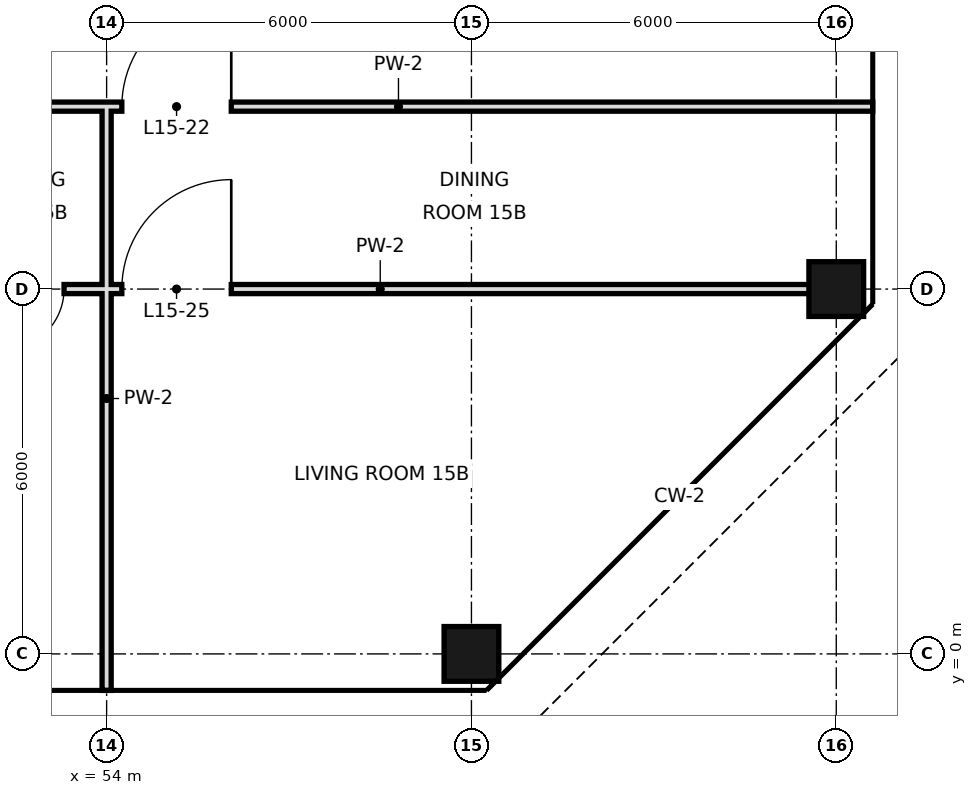
"""IFC4 building model, lengths in metres.
Left out: names, types, materials, properties, quantities, classifications, styles, units other than length and angle.
Written with IfcOpenShell. Run it as: python <this file> out.ifc"""

import sys

from ifc_helpers import new_model, si_unit, direction, frame, frame_2d, origin, origin_2d, place, context, subcontext, project, spatial, rectangle, hollow_rectangle, extrude, element, fill, save


model = new_model("IFC4")
c1 = context("Model", 3, precision=1e-05, world=origin(), true_north=direction((0.0, 1.0)))
c2 = subcontext(c1, "Body", "Model", "MODEL_VIEW")
j1 = project(units=[si_unit("LENGTHUNIT", "METRE"), si_unit("PLANEANGLEUNIT", "RADIAN")], contexts=[c1])
p1 = place(None, origin())
s1 = spatial("IfcSite", under=j1, at=p1, CompositionType="ELEMENT")
p2 = place(p1, origin())
s2 = spatial("IfcBuilding", under=s1, at=p2, CompositionType="ELEMENT")
p3 = place(p2, frame((0.0, 0.0, 75.0)))
s3 = spatial("IfcBuildingStorey", under=s2, at=p3, CompositionType="ELEMENT", Elevation=75.0)
for number, where, z_axis, x_axis in (
    (1, (60.0, 0.0, 0.0), (0.0, 0.0, 1.0), (1.0, 0.0, 0.0)),
    (2, (66.0, 6.0, 0.0), (0.0, 0.0, 1.0), (1.0, 0.0, 0.0)),
):
    element("IfcColumn", number, at=place(p3, frame(where, z_axis=z_axis, x_axis=x_axis)), inside=s3, PredefinedType="COLUMN", context=c2, shape_type="SweptSolid", body=[
        extrude(hollow_rectangle(XDim=0.9, YDim=0.9, WallThickness=0.045, at=origin_2d()), origin(), (0.0, 0.0, 1.0), 3.6),
    ])
p4 = place(p3, frame((54.0, -0.6, 0.0), z_axis=(0.0, 0.0, 1.0), x_axis=(0.0, 1.0, 0.0)))
e3 = element("IfcWall", 3, at=p4, inside=s3, PredefinedType="PARTITIONING", context=c2, shape_type="SweptSolid", body=[
    extrude(rectangle(XDim=9.6, YDim=0.15, at=frame_2d((4.8, 0.0))), origin(), (0.0, 0.0, 1.0), 3.42),
])
p5 = place(p3, frame((51.0, 6.0, 0.0), z_axis=(0.0, 0.0, 1.0), x_axis=(1.0, 0.0, 0.0)))
e4 = element("IfcWall", 4, at=p5, inside=s3, PredefinedType="PARTITIONING", context=c2, shape_type="SweptSolid", body=[
    extrude(rectangle(XDim=15.0, YDim=0.15, at=frame_2d((7.5, 0.0))), origin(), (0.0, 0.0, 1.0), 2.52),
])
p6 = place(p5, frame((1.3, 0.0, 0.0)))
e5 = element("IfcOpeningElement", 5, at=p6, cuts=e4, PredefinedType="OPENING", context=c2, shape_type="SweptSolid", body=[
    extrude(rectangle(XDim=1.0, YDim=2.4, at=frame_2d((0.5, 1.2))), frame((0.0, 0.085, 0.0), z_axis=(0.0, -1.0, 0.0), x_axis=(1.0, 0.0, 0.0)), (0.0, 0.0, 1.0), 0.17),
])
p7 = place(p5, frame((3.25, 0.0, 0.0)))
e6 = element("IfcOpeningElement", 6, at=p7, cuts=e4, PredefinedType="OPENING", context=c2, shape_type="SweptSolid", body=[
    extrude(rectangle(XDim=1.8, YDim=2.4, at=frame_2d((0.9, 1.2))), frame((0.0, 0.085, 0.0), z_axis=(0.0, -1.0, 0.0), x_axis=(1.0, 0.0, 0.0)), (0.0, 0.0, 1.0), 0.17),
])
p8 = place(p3, frame((51.0, 9.0, 0.0), z_axis=(0.0, 0.0, 1.0), x_axis=(1.0, 0.0, 0.0)))
e7 = element("IfcWall", 7, at=p8, inside=s3, PredefinedType="PARTITIONING", context=c2, shape_type="SweptSolid", body=[
    extrude(rectangle(XDim=15.6, YDim=0.15, at=frame_2d((7.8, 0.0))), origin(), (0.0, 0.0, 1.0), 3.42),
])
p9 = place(p8, frame((1.0, 0.0, 0.0)))
e8 = element("IfcOpeningElement", 8, at=p9, cuts=e7, PredefinedType="OPENING", context=c2, shape_type="SweptSolid", body=[
    extrude(rectangle(XDim=1.0, YDim=2.4, at=frame_2d((0.5, 1.2))), frame((0.0, 0.085, 0.0), z_axis=(0.0, -1.0, 0.0), x_axis=(1.0, 0.0, 0.0)), (0.0, 0.0, 1.0), 0.17),
])
p10 = place(p8, frame((3.25, 0.0, 0.0)))
e9 = element("IfcOpeningElement", 9, at=p10, cuts=e7, PredefinedType="OPENING", context=c2, shape_type="SweptSolid", body=[
    extrude(rectangle(XDim=1.8, YDim=2.4, at=frame_2d((0.9, 1.2))), frame((0.0, 0.085, 0.0), z_axis=(0.0, -1.0, 0.0), x_axis=(1.0, 0.0, 0.0)), (0.0, 0.0, 1.0), 0.17),
])
p11 = place(p10, frame((1.8, 0.0, 0.0), z_axis=(0.0, 0.0, 1.0), x_axis=(-1.0, 0.0, 0.0)))
e10 = element("IfcDoor", 10, at=p11, inside=s3, OperationType="SINGLE_SWING_LEFT", PredefinedType="DOOR", context=c2, shape_type="SweptSolid", body=[
    extrude(rectangle(XDim=1.8, YDim=2.4, at=frame_2d((0.9, 1.2))), frame((0.0, 0.025, 0.0), z_axis=(0.0, -1.0, 0.0), x_axis=(1.0, 0.0, 0.0)), (0.0, 0.0, 1.0), 0.05),
])
fill(e9, e10)
p12 = place(p6, frame((1.0, 0.0, 0.0), z_axis=(0.0, 0.0, 1.0), x_axis=(-1.0, 0.0, 0.0)))
e11 = element("IfcDoor", 11, at=p12, inside=s3, OperationType="SINGLE_SWING_RIGHT", PredefinedType="DOOR", context=c2, shape_type="SweptSolid", body=[
    extrude(rectangle(XDim=1.0, YDim=2.4, at=frame_2d((0.5, 1.2))), frame((0.0, 0.025, 0.0), z_axis=(0.0, -1.0, 0.0), x_axis=(1.0, 0.0, 0.0)), (0.0, 0.0, 1.0), 0.05),
])
fill(e5, e11)
p13 = place(p7, frame((1.8, 0.0, 0.0), z_axis=(0.0, 0.0, 1.0), x_axis=(-1.0, 0.0, 0.0)))
e12 = element("IfcDoor", 12, at=p13, inside=s3, OperationType="SINGLE_SWING_LEFT", PredefinedType="DOOR", context=c2, shape_type="SweptSolid", body=[
    extrude(rectangle(XDim=1.8, YDim=2.4, at=frame_2d((0.9, 1.2))), frame((0.0, 0.025, 0.0), z_axis=(0.0, -1.0, 0.0), x_axis=(1.0, 0.0, 0.0)), (0.0, 0.0, 1.0), 0.05),
])
fill(e6, e12)
save(model, sys.argv[1])
